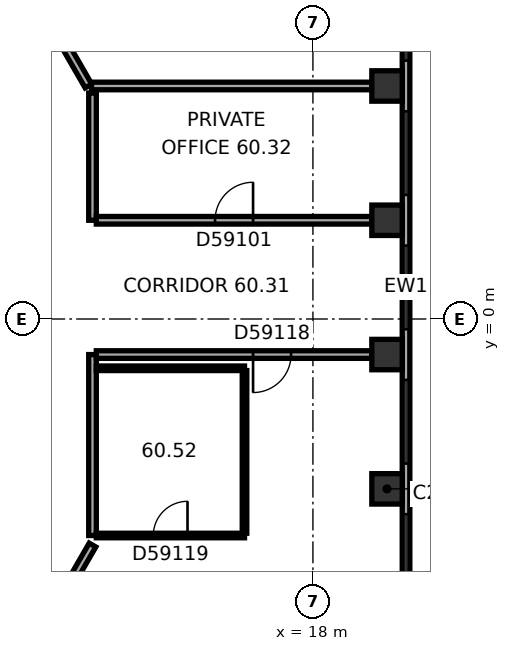
"""IFC4 building model, lengths in metres.
Left out: names, types, materials, properties, quantities, classifications, styles, units other than length and angle.
Written with IfcOpenShell. Run it as: python <this file> out.ifc"""

import sys

from ifc_helpers import new_model, si_unit, direction, frame, frame_2d, origin, origin_2d, place, context, subcontext, project, spatial, rectangle, extrude, element, fill, save


model = new_model("IFC4")
c1 = context("Model", 3, precision=1e-05, world=origin(), true_north=direction((0.0, 1.0)))
c2 = subcontext(c1, "Body", "Model", "MODEL_VIEW")
j1 = project(units=[si_unit("LENGTHUNIT", "METRE"), si_unit("PLANEANGLEUNIT", "RADIAN")], contexts=[c1])
p1 = place(None, origin())
s1 = spatial("IfcSite", under=j1, at=p1, CompositionType="ELEMENT")
p2 = place(p1, origin())
s2 = spatial("IfcBuilding", under=s1, at=p2, CompositionType="ELEMENT")
p3 = place(p2, frame((0.0, 0.0, 243.9)))
s3 = spatial("IfcBuildingStorey", under=s2, at=p3, CompositionType="ELEMENT", Elevation=243.9)
for number, where, z_axis, x_axis in (
    (1, (19.95, -4.469, 0.0), (0.0, 0.0, 1.0), (0.0, 1.0, 0.0)),
    (2, (19.95, -0.936, 0.0), (0.0, 0.0, 1.0), (0.0, 1.0, 0.0)),
    (3, (19.95, 2.598, 0.0), (0.0, 0.0, 1.0), (0.0, 1.0, 0.0)),
    (4, (19.95, 6.132, 0.0), (0.0, 0.0, 1.0), (0.0, 1.0, 0.0)),
):
    element("IfcColumn", number, at=place(p3, frame(where, z_axis=z_axis, x_axis=x_axis)), inside=s3, PredefinedType="COLUMN", context=c2, shape_type="SweptSolid", body=[
        extrude(rectangle(XDim=0.8, YDim=0.8, at=origin_2d()), origin(), (0.0, 0.0, 1.0), 3.7),
    ])
p4 = place(p3, frame((20.45, -8.59, 0.0), z_axis=(0.0, 0.0, 1.0), x_axis=(0.0, 1.0, 0.0)))
e5 = element("IfcWall", 5, at=p4, inside=s3, PredefinedType="STANDARD", context=c2, shape_type="SweptSolid", body=[
    extrude(rectangle(XDim=18.841, YDim=0.2, at=frame_2d((9.421, 0.0))), origin(), (0.0, 0.0, 1.0), 3.7),
])
p5 = place(p4, frame((1.254, 0.0, 0.9)))
e6 = element("IfcOpeningElement", 6, at=p5, cuts=e5, PredefinedType="OPENING", context=c2, shape_type="SweptSolid", body=[
    extrude(rectangle(XDim=2.2, YDim=2.0, at=frame_2d((1.1, 1.0))), frame((0.0, 0.11, 0.0), z_axis=(0.0, -1.0, 0.0), x_axis=(1.0, 0.0, 0.0)), (0.0, 0.0, 1.0), 0.22),
])
p6 = place(p4, frame((4.788, 0.0, 0.9)))
e7 = element("IfcOpeningElement", 7, at=p6, cuts=e5, PredefinedType="OPENING", context=c2, shape_type="SweptSolid", body=[
    extrude(rectangle(XDim=2.2, YDim=2.0, at=frame_2d((1.1, 1.0))), frame((0.0, 0.11, 0.0), z_axis=(0.0, -1.0, 0.0), x_axis=(1.0, 0.0, 0.0)), (0.0, 0.0, 1.0), 0.22),
])
p7 = place(p4, frame((8.322, 0.0, 0.9)))
e8 = element("IfcOpeningElement", 8, at=p7, cuts=e5, PredefinedType="OPENING", context=c2, shape_type="SweptSolid", body=[
    extrude(rectangle(XDim=2.2, YDim=2.0, at=frame_2d((1.1, 1.0))), frame((0.0, 0.11, 0.0), z_axis=(0.0, -1.0, 0.0), x_axis=(1.0, 0.0, 0.0)), (0.0, 0.0, 1.0), 0.22),
])
p8 = place(p4, frame((11.855, 0.0, 0.9)))
e9 = element("IfcOpeningElement", 9, at=p8, cuts=e5, PredefinedType="OPENING", context=c2, shape_type="SweptSolid", body=[
    extrude(rectangle(XDim=2.2, YDim=2.0, at=frame_2d((1.1, 1.0))), frame((0.0, 0.11, 0.0), z_axis=(0.0, -1.0, 0.0), x_axis=(1.0, 0.0, 0.0)), (0.0, 0.0, 1.0), 0.22),
])
p9 = place(p4, frame((15.389, 0.0, 0.9)))
e10 = element("IfcOpeningElement", 10, at=p9, cuts=e5, PredefinedType="OPENING", context=c2, shape_type="SweptSolid", body=[
    extrude(rectangle(XDim=2.2, YDim=2.0, at=frame_2d((1.1, 1.0))), frame((0.0, 0.11, 0.0), z_axis=(0.0, -1.0, 0.0), x_axis=(1.0, 0.0, 0.0)), (0.0, 0.0, 1.0), 0.22),
])
p10 = place(p3, frame((11.27, -7.558, 0.0), z_axis=(0.0, 0.0, 1.0), x_axis=(0.499964847546, 0.866045698112, 0.0)))
e11 = element("IfcWall", 11, at=p10, inside=s3, PredefinedType="PARTITIONING", context=c2, shape_type="SweptSolid", body=[
    extrude(rectangle(XDim=1.86, YDim=0.2, at=frame_2d((0.93, 0.0))), origin(), (0.0, 0.0, 1.0), 3.42),
])
p11 = place(p3, frame((12.093, 6.132, 0.0), z_axis=(0.0, 0.0, 1.0), x_axis=(-0.500031561776, 0.866007180818, 0.0)))
e12 = element("IfcWall", 12, at=p11, inside=s3, PredefinedType="PARTITIONING", context=c2, shape_type="SweptSolid", body=[
    extrude(rectangle(XDim=1.687, YDim=0.2, at=frame_2d((0.843, 0.0))), origin(), (0.0, 0.0, 1.0), 3.42),
])
p12 = place(p3, frame((12.2, -5.697, 0.0), z_axis=(0.0, 0.0, 1.0), x_axis=(0.0, 1.0, 0.0)))
e13 = element("IfcWall", 13, at=p12, inside=s3, PredefinedType="PARTITIONING", context=c2, shape_type="SweptSolid", body=[
    extrude(rectangle(XDim=4.761, YDim=0.2, at=frame_2d((2.381, 0.0))), origin(), (0.0, 0.0, 1.0), 3.42),
])
p13 = place(p3, frame((12.2, 2.598, 0.0), z_axis=(0.0, 0.0, 1.0), x_axis=(0.0, 1.0, 0.0)))
e14 = element("IfcWall", 14, at=p13, inside=s3, PredefinedType="PARTITIONING", context=c2, shape_type="SweptSolid", body=[
    extrude(rectangle(XDim=3.349, YDim=0.2, at=frame_2d((1.674, 0.0))), origin(), (0.0, 0.0, 1.0), 3.42),
])
p14 = place(p3, frame((12.3, -1.297, 0.0), z_axis=(0.0, 0.0, 1.0), x_axis=(1.0, 0.0, 0.0)))
e15 = element("IfcWall", 15, at=p14, inside=s3, PredefinedType="PARTITIONING", context=c2, shape_type="SweptSolid", body=[
    extrude(rectangle(XDim=3.9, YDim=0.12, at=frame_2d((1.95, 0.0))), origin(), (0.0, 0.0, 1.0), 3.42),
])
p15 = place(p3, frame((12.3, -0.936, 0.0), z_axis=(0.0, 0.0, 1.0), x_axis=(1.0, 0.0, 0.0)))
e16 = element("IfcWall", 16, at=p15, inside=s3, PredefinedType="PARTITIONING", context=c2, shape_type="SweptSolid", body=[
    extrude(rectangle(XDim=7.25, YDim=0.2, at=frame_2d((3.625, 0.0))), origin(), (0.0, 0.0, 1.0), 2.87),
])
p16 = place(p15, frame((4.125, 0.0, 0.0)))
e17 = element("IfcOpeningElement", 17, at=p16, cuts=e16, PredefinedType="OPENING", context=c2, shape_type="SweptSolid", body=[
    extrude(rectangle(XDim=1.0, YDim=2.1, at=frame_2d((0.5, 1.05))), frame((0.0, 0.11, 0.0), z_axis=(0.0, -1.0, 0.0), x_axis=(1.0, 0.0, 0.0)), (0.0, 0.0, 1.0), 0.22),
])
p17 = place(p3, frame((16.2, -5.697, 0.0), z_axis=(0.0, 0.0, 1.0), x_axis=(-1.0, 0.0, 0.0)))
e18 = element("IfcWall", 18, at=p17, inside=s3, PredefinedType="PARTITIONING", context=c2, shape_type="SweptSolid", body=[
    extrude(rectangle(XDim=3.9, YDim=0.12, at=frame_2d((1.95, 0.0))), origin(), (0.0, 0.0, 1.0), 3.42),
])
p18 = place(p17, frame((1.5, 0.0, 0.0)))
e19 = element("IfcOpeningElement", 19, at=p18, cuts=e18, PredefinedType="OPENING", context=c2, shape_type="SweptSolid", body=[
    extrude(rectangle(XDim=0.9, YDim=2.1, at=frame_2d((0.45, 1.05))), frame((0.0, 0.07, 0.0), z_axis=(0.0, -1.0, 0.0), x_axis=(1.0, 0.0, 0.0)), (0.0, 0.0, 1.0), 0.14),
])
p19 = place(p3, frame((16.2, -1.357, 0.0), z_axis=(0.0, 0.0, 1.0), x_axis=(0.0, -1.0, 0.0)))
e20 = element("IfcWall", 20, at=p19, inside=s3, PredefinedType="PARTITIONING", context=c2, shape_type="SweptSolid", body=[
    extrude(rectangle(XDim=4.28, YDim=0.12, at=frame_2d((2.14, 0.0))), origin(), (0.0, 0.0, 1.0), 3.42),
])
p20 = place(p3, frame((19.55, 2.598, 0.0), z_axis=(0.0, 0.0, 1.0), x_axis=(-1.0, 0.0, 0.0)))
e21 = element("IfcWall", 21, at=p20, inside=s3, PredefinedType="PARTITIONING", context=c2, shape_type="SweptSolid", body=[
    extrude(rectangle(XDim=7.25, YDim=0.2, at=frame_2d((3.625, 0.0))), origin(), (0.0, 0.0, 1.0), 3.42),
])
p21 = place(p20, frame((3.125, 0.0, 0.0)))
e22 = element("IfcOpeningElement", 22, at=p21, cuts=e21, PredefinedType="OPENING", context=c2, shape_type="SweptSolid", body=[
    extrude(rectangle(XDim=1.0, YDim=2.1, at=frame_2d((0.5, 1.05))), frame((0.0, 0.11, 0.0), z_axis=(0.0, -1.0, 0.0), x_axis=(1.0, 0.0, 0.0)), (0.0, 0.0, 1.0), 0.22),
])
p22 = place(p3, frame((19.55, 6.132, 0.0), z_axis=(0.0, 0.0, 1.0), x_axis=(-1.0, 0.0, 0.0)))
e23 = element("IfcWall", 23, at=p22, inside=s3, PredefinedType="PARTITIONING", context=c2, shape_type="SweptSolid", body=[
    extrude(rectangle(XDim=7.377, YDim=0.2, at=frame_2d((3.688, 0.0))), origin(), (0.0, 0.0, 1.0), 3.42),
])
p23 = place(p5, origin())
e24 = element("IfcWindow", 24, at=p23, inside=s3, PartitioningType="SINGLE_PANEL", PredefinedType="WINDOW", context=c2, shape_type="SweptSolid", body=[
    extrude(rectangle(XDim=2.2, YDim=2.0, at=frame_2d((1.1, 1.0))), frame((0.0, 0.03, 0.0), z_axis=(0.0, -1.0, 0.0), x_axis=(1.0, 0.0, 0.0)), (0.0, 0.0, 1.0), 0.06),
])
fill(e6, e24)
p24 = place(p6, origin())
e25 = element("IfcWindow", 25, at=p24, inside=s3, PartitioningType="SINGLE_PANEL", PredefinedType="WINDOW", context=c2, shape_type="SweptSolid", body=[
    extrude(rectangle(XDim=2.2, YDim=2.0, at=frame_2d((1.1, 1.0))), frame((0.0, 0.03, 0.0), z_axis=(0.0, -1.0, 0.0), x_axis=(1.0, 0.0, 0.0)), (0.0, 0.0, 1.0), 0.06),
])
fill(e7, e25)
p25 = place(p7, origin())
e26 = element("IfcWindow", 26, at=p25, inside=s3, PartitioningType="SINGLE_PANEL", PredefinedType="WINDOW", context=c2, shape_type="SweptSolid", body=[
    extrude(rectangle(XDim=2.2, YDim=2.0, at=frame_2d((1.1, 1.0))), frame((0.0, 0.03, 0.0), z_axis=(0.0, -1.0, 0.0), x_axis=(1.0, 0.0, 0.0)), (0.0, 0.0, 1.0), 0.06),
])
fill(e8, e26)
p26 = place(p8, origin())
e27 = element("IfcWindow", 27, at=p26, inside=s3, PartitioningType="SINGLE_PANEL", PredefinedType="WINDOW", context=c2, shape_type="SweptSolid", body=[
    extrude(rectangle(XDim=2.2, YDim=2.0, at=frame_2d((1.1, 1.0))), frame((0.0, 0.03, 0.0), z_axis=(0.0, -1.0, 0.0), x_axis=(1.0, 0.0, 0.0)), (0.0, 0.0, 1.0), 0.06),
])
fill(e9, e27)
p27 = place(p9, origin())
e28 = element("IfcWindow", 28, at=p27, inside=s3, PartitioningType="SINGLE_PANEL", PredefinedType="WINDOW", context=c2, shape_type="SweptSolid", body=[
    extrude(rectangle(XDim=2.2, YDim=2.0, at=frame_2d((1.1, 1.0))), frame((0.0, 0.03, 0.0), z_axis=(0.0, -1.0, 0.0), x_axis=(1.0, 0.0, 0.0)), (0.0, 0.0, 1.0), 0.06),
])
fill(e10, e28)
p28 = place(p21, origin())
e29 = element("IfcDoor", 29, at=p28, inside=s3, OperationType="SINGLE_SWING_LEFT", PredefinedType="DOOR", context=c2, shape_type="SweptSolid", body=[
    extrude(rectangle(XDim=1.0, YDim=2.1, at=frame_2d((0.5, 1.05))), frame((0.0, 0.025, 0.0), z_axis=(0.0, -1.0, 0.0), x_axis=(1.0, 0.0, 0.0)), (0.0, 0.0, 1.0), 0.05),
])
fill(e22, e29)
p29 = place(p16, origin())
e30 = element("IfcDoor", 30, at=p29, inside=s3, OperationType="SINGLE_SWING_LEFT", PredefinedType="DOOR", context=c2, shape_type="SweptSolid", body=[
    extrude(rectangle(XDim=1.0, YDim=2.1, at=frame_2d((0.5, 1.05))), frame((0.0, 0.025, 0.0), z_axis=(0.0, -1.0, 0.0), x_axis=(1.0, 0.0, 0.0)), (0.0, 0.0, 1.0), 0.05),
])
fill(e17, e30)
p30 = place(p18, origin())
e31 = element("IfcDoor", 31, at=p30, inside=s3, OperationType="SINGLE_SWING_LEFT", PredefinedType="DOOR", context=c2, shape_type="SweptSolid", body=[
    extrude(rectangle(XDim=0.9, YDim=2.1, at=frame_2d((0.45, 1.05))), frame((0.0, 0.025, 0.0), z_axis=(0.0, -1.0, 0.0), x_axis=(1.0, 0.0, 0.0)), (0.0, 0.0, 1.0), 0.05),
])
fill(e19, e31)
save(model, sys.argv[1])
